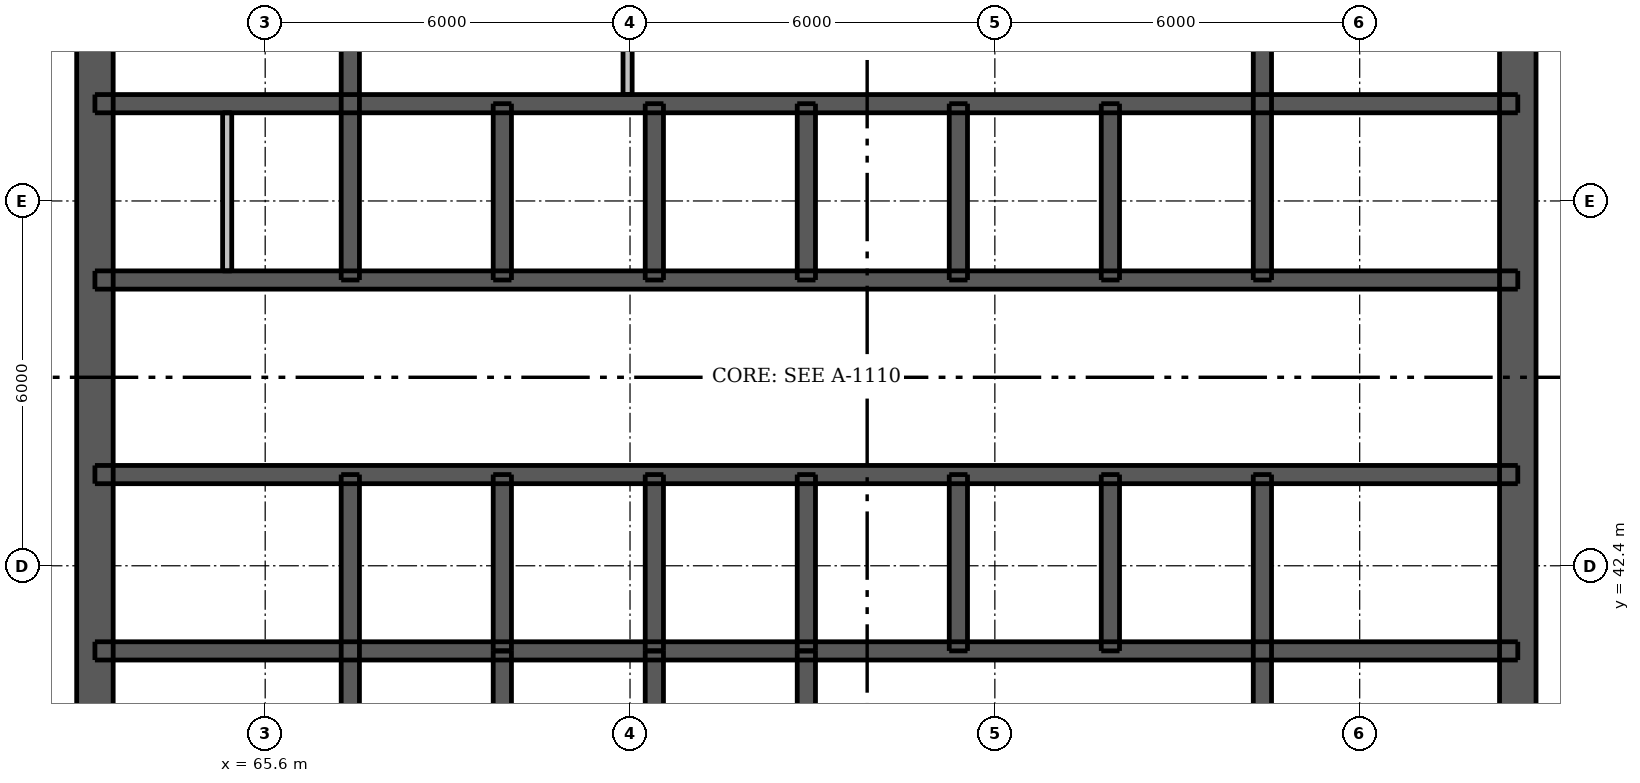
"""IFC4 building model, lengths in metres.
Left out: names, types, materials, properties, quantities, classifications, styles, units other than length and angle.
Written with IfcOpenShell. Run it as: python <this file> out.ifc"""

import sys

from ifc_helpers import new_model, si_unit, direction, frame, frame_2d, origin, place, context, subcontext, project, spatial, rectangle, extrude, element, fill, save


model = new_model("IFC4")
c1 = context("Model", 3, precision=1e-05, world=origin(), true_north=direction((0.0, 1.0)))
c2 = subcontext(c1, "Body", "Model", "MODEL_VIEW")
j1 = project(units=[si_unit("LENGTHUNIT", "METRE"), si_unit("PLANEANGLEUNIT", "RADIAN")], contexts=[c1])
p1 = place(None, origin())
s1 = spatial("IfcSite", under=j1, at=p1, CompositionType="ELEMENT")
p2 = place(p1, origin())
s2 = spatial("IfcBuilding", under=s1, at=p2, CompositionType="ELEMENT")
p3 = place(p2, frame((0.0, 0.0, 200.2)))
s3 = spatial("IfcBuildingStorey", under=s2, at=p3, CompositionType="ELEMENT", Elevation=200.2)
p4 = place(p3, frame((62.8, 33.5, 0.0), z_axis=(0.0, 0.0, 1.0), x_axis=(0.0, 1.0, 0.0)))
e1 = element("IfcWall", 1, at=p4, inside=s3, PredefinedType="SHEAR", context=c2, shape_type="SweptSolid", body=[
    extrude(rectangle(XDim=24.0, YDim=0.6, at=frame_2d((12.0, 0.0))), origin(), (0.0, 0.0, 1.0), 3.05),
])
p5 = place(p4, frame((11.2, 0.0, 0.0)))
e2 = element("IfcOpeningElement", 2, at=p5, cuts=e1, PredefinedType="OPENING", context=c2, shape_type="SweptSolid", body=[
    extrude(rectangle(XDim=1.6, YDim=2.1, at=frame_2d((0.8, 1.05))), frame((0.0, 0.31, 0.0), z_axis=(0.0, -1.0, 0.0), x_axis=(1.0, 0.0, 0.0)), (0.0, 0.0, 1.0), 0.62),
])
p6 = place(p3, frame((86.2, 33.5, 0.0), z_axis=(0.0, 0.0, 1.0), x_axis=(0.0, 1.0, 0.0)))
e3 = element("IfcWall", 3, at=p6, inside=s3, PredefinedType="SHEAR", context=c2, shape_type="SweptSolid", body=[
    extrude(rectangle(XDim=24.0, YDim=0.6, at=frame_2d((12.0, 0.0))), origin(), (0.0, 0.0, 1.0), 3.05),
])
p7 = place(p6, frame((11.2, 0.0, 0.0)))
e4 = element("IfcOpeningElement", 4, at=p7, cuts=e3, PredefinedType="OPENING", context=c2, shape_type="SweptSolid", body=[
    extrude(rectangle(XDim=1.6, YDim=2.1, at=frame_2d((0.8, 1.05))), frame((0.0, 0.31, 0.0), z_axis=(0.0, -1.0, 0.0), x_axis=(1.0, 0.0, 0.0)), (0.0, 0.0, 1.0), 0.62),
])
p8 = place(p3, frame((62.8, 41.0, 0.0), z_axis=(0.0, 0.0, 1.0), x_axis=(1.0, 0.0, 0.0)))
e5 = element("IfcWall", 5, at=p8, inside=s3, PredefinedType="SHEAR", context=c2, shape_type="SweptSolid", body=[
    extrude(rectangle(XDim=23.4, YDim=0.3, at=frame_2d((11.7, 0.0))), origin(), (0.0, 0.0, 1.0), 3.05),
])
p9 = place(p3, frame((62.8, 43.9, 0.0), z_axis=(0.0, 0.0, 1.0), x_axis=(1.0, 0.0, 0.0)))
e6 = element("IfcWall", 6, at=p9, inside=s3, PredefinedType="SHEAR", context=c2, shape_type="SweptSolid", body=[
    extrude(rectangle(XDim=23.4, YDim=0.3, at=frame_2d((11.7, 0.0))), origin(), (0.0, 0.0, 1.0), 3.05),
])
p10 = place(p9, frame((1.725, 0.0, 0.0)))
e7 = element("IfcOpeningElement", 7, at=p10, cuts=e6, PredefinedType="OPENING", context=c2, shape_type="SweptSolid", body=[
    extrude(rectangle(XDim=0.9, YDim=2.1, at=frame_2d((0.45, 1.05))), frame((0.0, 0.16, 0.0), z_axis=(0.0, -1.0, 0.0), x_axis=(1.0, 0.0, 0.0)), (0.0, 0.0, 1.0), 0.32),
])
p11 = place(p9, frame((20.775, 0.0, 0.0)))
e8 = element("IfcOpeningElement", 8, at=p11, cuts=e6, PredefinedType="OPENING", context=c2, shape_type="SweptSolid", body=[
    extrude(rectangle(XDim=0.9, YDim=2.1, at=frame_2d((0.45, 1.05))), frame((0.0, 0.16, 0.0), z_axis=(0.0, -1.0, 0.0), x_axis=(1.0, 0.0, 0.0)), (0.0, 0.0, 1.0), 0.32),
])
p12 = place(p9, frame((5.0, 0.0, 0.0)))
e9 = element("IfcOpeningElement", 9, at=p12, cuts=e6, PredefinedType="OPENING", context=c2, shape_type="SweptSolid", body=[
    extrude(rectangle(XDim=0.9, YDim=2.1, at=frame_2d((0.45, 1.05))), frame((0.0, 0.16, 0.0), z_axis=(0.0, -1.0, 0.0), x_axis=(1.0, 0.0, 0.0)), (0.0, 0.0, 1.0), 0.32),
])
p13 = place(p9, frame((7.5, 0.0, 0.0)))
e10 = element("IfcOpeningElement", 10, at=p13, cuts=e6, PredefinedType="OPENING", context=c2, shape_type="SweptSolid", body=[
    extrude(rectangle(XDim=0.9, YDim=2.1, at=frame_2d((0.45, 1.05))), frame((0.0, 0.16, 0.0), z_axis=(0.0, -1.0, 0.0), x_axis=(1.0, 0.0, 0.0)), (0.0, 0.0, 1.0), 0.32),
])
p14 = place(p9, frame((12.5, 0.0, 0.0)))
e11 = element("IfcOpeningElement", 11, at=p14, cuts=e6, PredefinedType="OPENING", context=c2, shape_type="SweptSolid", body=[
    extrude(rectangle(XDim=0.9, YDim=2.1, at=frame_2d((0.45, 1.05))), frame((0.0, 0.16, 0.0), z_axis=(0.0, -1.0, 0.0), x_axis=(1.0, 0.0, 0.0)), (0.0, 0.0, 1.0), 0.32),
])
p15 = place(p9, frame((15.0, 0.0, 0.0)))
e12 = element("IfcOpeningElement", 12, at=p15, cuts=e6, PredefinedType="OPENING", context=c2, shape_type="SweptSolid", body=[
    extrude(rectangle(XDim=0.9, YDim=2.1, at=frame_2d((0.45, 1.05))), frame((0.0, 0.16, 0.0), z_axis=(0.0, -1.0, 0.0), x_axis=(1.0, 0.0, 0.0)), (0.0, 0.0, 1.0), 0.32),
])
p16 = place(p3, frame((62.8, 47.1, 0.0), z_axis=(0.0, 0.0, 1.0), x_axis=(1.0, 0.0, 0.0)))
e13 = element("IfcWall", 13, at=p16, inside=s3, PredefinedType="SHEAR", context=c2, shape_type="SweptSolid", body=[
    extrude(rectangle(XDim=23.4, YDim=0.3, at=frame_2d((11.7, 0.0))), origin(), (0.0, 0.0, 1.0), 3.05),
])
p17 = place(p16, frame((0.788, 0.0, 0.0)))
e14 = element("IfcOpeningElement", 14, at=p17, cuts=e13, PredefinedType="OPENING", context=c2, shape_type="SweptSolid", body=[
    extrude(rectangle(XDim=0.9, YDim=2.1, at=frame_2d((0.45, 1.05))), frame((0.0, 0.16, 0.0), z_axis=(0.0, -1.0, 0.0), x_axis=(1.0, 0.0, 0.0)), (0.0, 0.0, 1.0), 0.32),
])
p18 = place(p16, frame((2.663, 0.0, 0.0)))
e15 = element("IfcOpeningElement", 15, at=p18, cuts=e13, PredefinedType="OPENING", context=c2, shape_type="SweptSolid", body=[
    extrude(rectangle(XDim=0.9, YDim=2.1, at=frame_2d((0.45, 1.05))), frame((0.0, 0.16, 0.0), z_axis=(0.0, -1.0, 0.0), x_axis=(1.0, 0.0, 0.0)), (0.0, 0.0, 1.0), 0.32),
])
p19 = place(p16, frame((20.775, 0.0, 0.0)))
e16 = element("IfcOpeningElement", 16, at=p19, cuts=e13, PredefinedType="OPENING", context=c2, shape_type="SweptSolid", body=[
    extrude(rectangle(XDim=0.9, YDim=2.1, at=frame_2d((0.45, 1.05))), frame((0.0, 0.16, 0.0), z_axis=(0.0, -1.0, 0.0), x_axis=(1.0, 0.0, 0.0)), (0.0, 0.0, 1.0), 0.32),
])
p20 = place(p16, frame((4.9, 0.0, 0.0)))
e17 = element("IfcOpeningElement", 17, at=p20, cuts=e13, PredefinedType="OPENING", context=c2, shape_type="SweptSolid", body=[
    extrude(rectangle(XDim=1.1, YDim=2.1, at=frame_2d((0.55, 1.05))), frame((0.0, 0.16, 0.0), z_axis=(0.0, -1.0, 0.0), x_axis=(1.0, 0.0, 0.0)), (0.0, 0.0, 1.0), 0.32),
])
p21 = place(p16, frame((7.4, 0.0, 0.0)))
e18 = element("IfcOpeningElement", 18, at=p21, cuts=e13, PredefinedType="OPENING", context=c2, shape_type="SweptSolid", body=[
    extrude(rectangle(XDim=1.1, YDim=2.1, at=frame_2d((0.55, 1.05))), frame((0.0, 0.16, 0.0), z_axis=(0.0, -1.0, 0.0), x_axis=(1.0, 0.0, 0.0)), (0.0, 0.0, 1.0), 0.32),
])
p22 = place(p16, frame((9.9, 0.0, 0.0)))
e19 = element("IfcOpeningElement", 19, at=p22, cuts=e13, PredefinedType="OPENING", context=c2, shape_type="SweptSolid", body=[
    extrude(rectangle(XDim=1.1, YDim=2.1, at=frame_2d((0.55, 1.05))), frame((0.0, 0.16, 0.0), z_axis=(0.0, -1.0, 0.0), x_axis=(1.0, 0.0, 0.0)), (0.0, 0.0, 1.0), 0.32),
])
p23 = place(p16, frame((12.4, 0.0, 0.0)))
e20 = element("IfcOpeningElement", 20, at=p23, cuts=e13, PredefinedType="OPENING", context=c2, shape_type="SweptSolid", body=[
    extrude(rectangle(XDim=1.1, YDim=2.1, at=frame_2d((0.55, 1.05))), frame((0.0, 0.16, 0.0), z_axis=(0.0, -1.0, 0.0), x_axis=(1.0, 0.0, 0.0)), (0.0, 0.0, 1.0), 0.32),
])
p24 = place(p16, frame((14.9, 0.0, 0.0)))
e21 = element("IfcOpeningElement", 21, at=p24, cuts=e13, PredefinedType="OPENING", context=c2, shape_type="SweptSolid", body=[
    extrude(rectangle(XDim=1.1, YDim=2.1, at=frame_2d((0.55, 1.05))), frame((0.0, 0.16, 0.0), z_axis=(0.0, -1.0, 0.0), x_axis=(1.0, 0.0, 0.0)), (0.0, 0.0, 1.0), 0.32),
])
p25 = place(p16, frame((17.4, 0.0, 0.0)))
e22 = element("IfcOpeningElement", 22, at=p25, cuts=e13, PredefinedType="OPENING", context=c2, shape_type="SweptSolid", body=[
    extrude(rectangle(XDim=1.1, YDim=2.1, at=frame_2d((0.55, 1.05))), frame((0.0, 0.16, 0.0), z_axis=(0.0, -1.0, 0.0), x_axis=(1.0, 0.0, 0.0)), (0.0, 0.0, 1.0), 0.32),
])
p26 = place(p3, frame((62.8, 50.0, 0.0), z_axis=(0.0, 0.0, 1.0), x_axis=(1.0, 0.0, 0.0)))
e23 = element("IfcWall", 23, at=p26, inside=s3, PredefinedType="SHEAR", context=c2, shape_type="SweptSolid", body=[
    extrude(rectangle(XDim=23.4, YDim=0.3, at=frame_2d((11.7, 0.0))), origin(), (0.0, 0.0, 1.0), 3.05),
])
p27 = place(p3, frame((67.0, 33.8, 0.0), z_axis=(0.0, 0.0, 1.0), x_axis=(0.0, 1.0, 0.0)))
e24 = element("IfcWall", 24, at=p27, inside=s3, PredefinedType="SHEAR", context=c2, shape_type="SweptSolid", body=[
    extrude(rectangle(XDim=10.1, YDim=0.3, at=frame_2d((5.05, 0.0))), origin(), (0.0, 0.0, 1.0), 3.05),
])
p28 = place(p27, frame((0.5, 0.0, 0.0)))
e25 = element("IfcOpeningElement", 25, at=p28, cuts=e24, PredefinedType="OPENING", context=c2, shape_type="SweptSolid", body=[
    extrude(rectangle(XDim=1.1, YDim=2.1, at=frame_2d((0.55, 1.05))), frame((0.0, 0.16, 0.0), z_axis=(0.0, -1.0, 0.0), x_axis=(1.0, 0.0, 0.0)), (0.0, 0.0, 1.0), 0.32),
])
for number, where, z_axis, x_axis in (
    (26, (67.0, 47.1, 0.0), (0.0, 0.0, 1.0), (0.0, 1.0, 0.0)),
    (27, (82.0, 33.8, 0.0), (0.0, 0.0, 1.0), (0.0, 1.0, 0.0)),
    (28, (82.0, 47.1, 0.0), (0.0, 0.0, 1.0), (0.0, 1.0, 0.0)),
):
    element("IfcWall", number, at=place(p3, frame(where, z_axis=z_axis, x_axis=x_axis)), inside=s3, PredefinedType="SHEAR", context=c2, shape_type="SweptSolid", body=[
        extrude(rectangle(XDim=10.1, YDim=0.3, at=frame_2d((5.05, 0.0))), origin(), (0.0, 0.0, 1.0), 3.05),
    ])
for number, where, z_axis, x_axis in (
    (29, (69.5, 41.0, 0.0), (0.0, 0.0, 1.0), (0.0, 1.0, 0.0)),
    (30, (69.5, 47.1, 0.0), (0.0, 0.0, 1.0), (0.0, 1.0, 0.0)),
    (31, (72.0, 41.0, 0.0), (0.0, 0.0, 1.0), (0.0, 1.0, 0.0)),
    (32, (72.0, 47.1, 0.0), (0.0, 0.0, 1.0), (0.0, 1.0, 0.0)),
    (33, (74.5, 41.0, 0.0), (0.0, 0.0, 1.0), (0.0, 1.0, 0.0)),
    (34, (74.5, 47.1, 0.0), (0.0, 0.0, 1.0), (0.0, 1.0, 0.0)),
    (35, (77.0, 41.0, 0.0), (0.0, 0.0, 1.0), (0.0, 1.0, 0.0)),
    (36, (77.0, 47.1, 0.0), (0.0, 0.0, 1.0), (0.0, 1.0, 0.0)),
    (37, (79.5, 41.0, 0.0), (0.0, 0.0, 1.0), (0.0, 1.0, 0.0)),
    (38, (79.5, 47.1, 0.0), (0.0, 0.0, 1.0), (0.0, 1.0, 0.0)),
    (39, (69.5, 38.1, 0.0), (0.0, 0.0, 1.0), (0.0, 1.0, 0.0)),
    (40, (72.0, 38.1, 0.0), (0.0, 0.0, 1.0), (0.0, 1.0, 0.0)),
    (41, (74.5, 38.1, 0.0), (0.0, 0.0, 1.0), (0.0, 1.0, 0.0)),
):
    element("IfcWall", number, at=place(p3, frame(where, z_axis=z_axis, x_axis=x_axis)), inside=s3, PredefinedType="SHEAR", context=c2, shape_type="SweptSolid", body=[
        extrude(rectangle(XDim=2.9, YDim=0.3, at=frame_2d((1.45, 0.0))), origin(), (0.0, 0.0, 1.0), 3.05),
    ])
p29 = place(p3, frame((64.975, 47.25, 0.0), z_axis=(0.0, 0.0, 1.0), x_axis=(0.0, 1.0, 0.0)))
e42 = element("IfcWall", 42, at=p29, inside=s3, PredefinedType="PLUMBINGWALL", context=c2, shape_type="SweptSolid", body=[
    extrude(rectangle(XDim=2.6, YDim=0.15, at=frame_2d((1.3, 0.0))), origin(), (0.0, 0.0, 1.0), 3.05),
])
p30 = place(p3, frame((71.56, 50.15, 0.0), z_axis=(0.0, 0.0, 1.0), x_axis=(0.0, 1.0, 0.0)))
e43 = element("IfcWall", 43, at=p30, inside=s3, PredefinedType="PLUMBINGWALL", context=c2, shape_type="SweptSolid", body=[
    extrude(rectangle(XDim=6.75, YDim=0.15, at=frame_2d((3.375, 0.0))), origin(), (0.0, 0.0, 1.0), 3.05),
])
p31 = place(p5, origin())
e44 = element("IfcDoor", 44, at=p31, inside=s3, OperationType="DOUBLE_DOOR_SINGLE_SWING", PredefinedType="DOOR", context=c2, shape_type="SweptSolid", body=[
    extrude(rectangle(XDim=1.6, YDim=2.1, at=frame_2d((0.8, 1.05))), frame((0.0, -0.237, 0.0), z_axis=(0.0, -1.0, 0.0), x_axis=(1.0, 0.0, 0.0)), (0.0, 0.0, 1.0), 0.05),
])
fill(e2, e44)
p32 = place(p7, origin())
e45 = element("IfcDoor", 45, at=p32, inside=s3, OperationType="DOUBLE_DOOR_SINGLE_SWING", PredefinedType="DOOR", context=c2, shape_type="SweptSolid", body=[
    extrude(rectangle(XDim=1.6, YDim=2.1, at=frame_2d((0.8, 1.05))), frame((0.0, 0.288, 0.0), z_axis=(0.0, -1.0, 0.0), x_axis=(1.0, 0.0, 0.0)), (0.0, 0.0, 1.0), 0.05),
])
fill(e4, e45)
p33 = place(p10, origin())
e46 = element("IfcDoor", 46, at=p33, inside=s3, OperationType="SINGLE_SWING_LEFT", PredefinedType="DOOR", context=c2, shape_type="SweptSolid", body=[
    extrude(rectangle(XDim=0.9, YDim=2.1, at=frame_2d((0.45, 1.05))), frame((0.0, -0.087, 0.0), z_axis=(0.0, -1.0, 0.0), x_axis=(1.0, 0.0, 0.0)), (0.0, 0.0, 1.0), 0.05),
])
fill(e7, e46)
p34 = place(p11, origin())
e47 = element("IfcDoor", 47, at=p34, inside=s3, OperationType="SINGLE_SWING_LEFT", PredefinedType="DOOR", context=c2, shape_type="SweptSolid", body=[
    extrude(rectangle(XDim=0.9, YDim=2.1, at=frame_2d((0.45, 1.05))), frame((0.0, -0.087, 0.0), z_axis=(0.0, -1.0, 0.0), x_axis=(1.0, 0.0, 0.0)), (0.0, 0.0, 1.0), 0.05),
])
fill(e8, e47)
p35 = place(p17, origin())
e48 = element("IfcDoor", 48, at=p35, inside=s3, OperationType="SINGLE_SWING_LEFT", PredefinedType="DOOR", context=c2, shape_type="SweptSolid", body=[
    extrude(rectangle(XDim=0.9, YDim=2.1, at=frame_2d((0.45, 1.05))), frame((0.0, 0.138, 0.0), z_axis=(0.0, -1.0, 0.0), x_axis=(1.0, 0.0, 0.0)), (0.0, 0.0, 1.0), 0.05),
])
fill(e14, e48)
p36 = place(p18, origin())
e49 = element("IfcDoor", 49, at=p36, inside=s3, OperationType="SINGLE_SWING_RIGHT", PredefinedType="DOOR", context=c2, shape_type="SweptSolid", body=[
    extrude(rectangle(XDim=0.9, YDim=2.1, at=frame_2d((0.45, 1.05))), frame((0.0, 0.138, 0.0), z_axis=(0.0, -1.0, 0.0), x_axis=(1.0, 0.0, 0.0)), (0.0, 0.0, 1.0), 0.05),
])
fill(e15, e49)
p37 = place(p19, origin())
e50 = element("IfcDoor", 50, at=p37, inside=s3, OperationType="SINGLE_SWING_LEFT", PredefinedType="DOOR", context=c2, shape_type="SweptSolid", body=[
    extrude(rectangle(XDim=0.9, YDim=2.1, at=frame_2d((0.45, 1.05))), frame((0.0, 0.138, 0.0), z_axis=(0.0, -1.0, 0.0), x_axis=(1.0, 0.0, 0.0)), (0.0, 0.0, 1.0), 0.05),
])
fill(e16, e50)
p38 = place(p12, origin())
e51 = element("IfcDoor", 51, at=p38, inside=s3, OperationType="SINGLE_SWING_RIGHT", PredefinedType="DOOR", context=c2, shape_type="SweptSolid", body=[
    extrude(rectangle(XDim=0.9, YDim=2.1, at=frame_2d((0.45, 1.05))), frame((0.0, -0.087, 0.0), z_axis=(0.0, -1.0, 0.0), x_axis=(1.0, 0.0, 0.0)), (0.0, 0.0, 1.0), 0.05),
])
fill(e9, e51)
p39 = place(p13, origin())
e52 = element("IfcDoor", 52, at=p39, inside=s3, OperationType="SINGLE_SWING_LEFT", PredefinedType="DOOR", context=c2, shape_type="SweptSolid", body=[
    extrude(rectangle(XDim=0.9, YDim=2.1, at=frame_2d((0.45, 1.05))), frame((0.0, -0.087, 0.0), z_axis=(0.0, -1.0, 0.0), x_axis=(1.0, 0.0, 0.0)), (0.0, 0.0, 1.0), 0.05),
])
fill(e10, e52)
p40 = place(p14, origin())
e53 = element("IfcDoor", 53, at=p40, inside=s3, OperationType="SINGLE_SWING_LEFT", PredefinedType="DOOR", context=c2, shape_type="SweptSolid", body=[
    extrude(rectangle(XDim=0.9, YDim=2.1, at=frame_2d((0.45, 1.05))), frame((0.0, -0.087, 0.0), z_axis=(0.0, -1.0, 0.0), x_axis=(1.0, 0.0, 0.0)), (0.0, 0.0, 1.0), 0.05),
])
fill(e11, e53)
p41 = place(p15, origin())
e54 = element("IfcDoor", 54, at=p41, inside=s3, OperationType="SINGLE_SWING_RIGHT", PredefinedType="DOOR", context=c2, shape_type="SweptSolid", body=[
    extrude(rectangle(XDim=0.9, YDim=2.1, at=frame_2d((0.45, 1.05))), frame((0.0, -0.087, 0.0), z_axis=(0.0, -1.0, 0.0), x_axis=(1.0, 0.0, 0.0)), (0.0, 0.0, 1.0), 0.05),
])
fill(e12, e54)
p42 = place(p20, origin())
e55 = element("IfcDoor", 55, at=p42, inside=s3, OperationType="DOUBLE_DOOR_SLIDING", PredefinedType="DOOR", context=c2, shape_type="SweptSolid", body=[
    extrude(rectangle(XDim=1.1, YDim=2.1, at=frame_2d((0.55, 1.05))), frame((0.0, 0.025, 0.0), z_axis=(0.0, -1.0, 0.0), x_axis=(1.0, 0.0, 0.0)), (0.0, 0.0, 1.0), 0.05),
])
fill(e17, e55)
p43 = place(p21, origin())
e56 = element("IfcDoor", 56, at=p43, inside=s3, OperationType="DOUBLE_DOOR_SLIDING", PredefinedType="DOOR", context=c2, shape_type="SweptSolid", body=[
    extrude(rectangle(XDim=1.1, YDim=2.1, at=frame_2d((0.55, 1.05))), frame((0.0, 0.025, 0.0), z_axis=(0.0, -1.0, 0.0), x_axis=(1.0, 0.0, 0.0)), (0.0, 0.0, 1.0), 0.05),
])
fill(e18, e56)
p44 = place(p22, origin())
e57 = element("IfcDoor", 57, at=p44, inside=s3, OperationType="DOUBLE_DOOR_SLIDING", PredefinedType="DOOR", context=c2, shape_type="SweptSolid", body=[
    extrude(rectangle(XDim=1.1, YDim=2.1, at=frame_2d((0.55, 1.05))), frame((0.0, 0.025, 0.0), z_axis=(0.0, -1.0, 0.0), x_axis=(1.0, 0.0, 0.0)), (0.0, 0.0, 1.0), 0.05),
])
fill(e19, e57)
p45 = place(p23, origin())
e58 = element("IfcDoor", 58, at=p45, inside=s3, OperationType="DOUBLE_DOOR_SLIDING", PredefinedType="DOOR", context=c2, shape_type="SweptSolid", body=[
    extrude(rectangle(XDim=1.1, YDim=2.1, at=frame_2d((0.55, 1.05))), frame((0.0, 0.025, 0.0), z_axis=(0.0, -1.0, 0.0), x_axis=(1.0, 0.0, 0.0)), (0.0, 0.0, 1.0), 0.05),
])
fill(e20, e58)
p46 = place(p24, origin())
e59 = element("IfcDoor", 59, at=p46, inside=s3, OperationType="DOUBLE_DOOR_SLIDING", PredefinedType="DOOR", context=c2, shape_type="SweptSolid", body=[
    extrude(rectangle(XDim=1.1, YDim=2.1, at=frame_2d((0.55, 1.05))), frame((0.0, 0.025, 0.0), z_axis=(0.0, -1.0, 0.0), x_axis=(1.0, 0.0, 0.0)), (0.0, 0.0, 1.0), 0.05),
])
fill(e21, e59)
p47 = place(p25, origin())
e60 = element("IfcDoor", 60, at=p47, inside=s3, OperationType="DOUBLE_DOOR_SLIDING", PredefinedType="DOOR", context=c2, shape_type="SweptSolid", body=[
    extrude(rectangle(XDim=1.1, YDim=2.1, at=frame_2d((0.55, 1.05))), frame((0.0, 0.025, 0.0), z_axis=(0.0, -1.0, 0.0), x_axis=(1.0, 0.0, 0.0)), (0.0, 0.0, 1.0), 0.05),
])
fill(e22, e60)
save(model, sys.argv[1])
